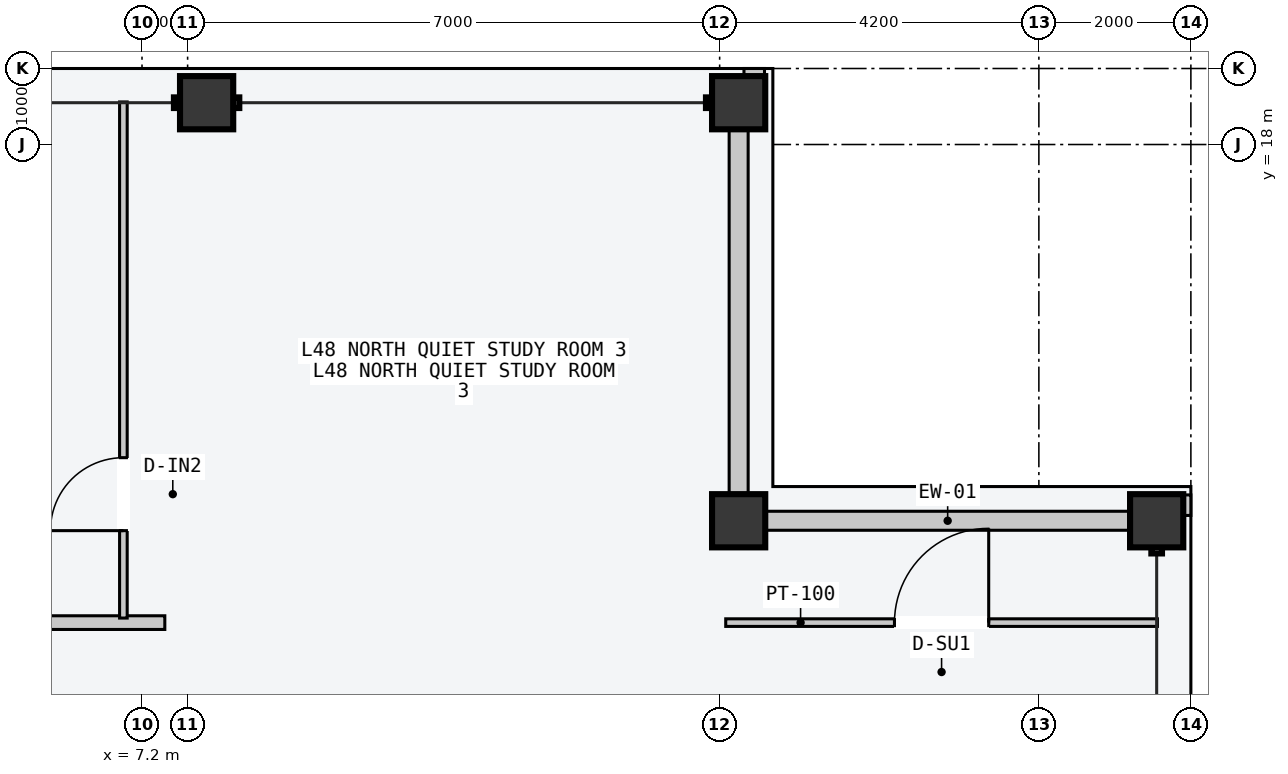
"""IFC4 building model, lengths in metres.
Left out: names, types, materials, properties, quantities, classifications, styles, units other than length and angle.
Written with IfcOpenShell. Run it as: python <this file> out.ifc"""

import sys

from ifc_helpers import new_model, si_unit, direction, frame, frame_2d, origin, origin_2d, place, context, subcontext, project, spatial, rectangle, hollow_rectangle, extrude, element, fill, save


model = new_model("IFC4")
c1 = context("Model", 3, precision=1e-05, world=origin(), true_north=direction((0.0, 1.0)))
c2 = subcontext(c1, "Body", "Model", "MODEL_VIEW")
j1 = project(units=[si_unit("LENGTHUNIT", "METRE"), si_unit("PLANEANGLEUNIT", "RADIAN")], contexts=[c1])
p1 = place(None, origin())
s1 = spatial("IfcSite", under=j1, at=p1, CompositionType="ELEMENT")
p2 = place(p1, origin())
s2 = spatial("IfcBuilding", under=s1, at=p2, CompositionType="ELEMENT")
p3 = place(p2, frame((0.0, 0.0, 183.9)))
s3 = spatial("IfcBuildingStorey", under=s2, at=p3, CompositionType="ELEMENT", Elevation=183.9)
for number, where, z_axis, x_axis in (
    (1, (8.05, 18.55, 0.0), (0.0, 0.0, 1.0), (1.0, 0.0, 0.0)),
    (2, (15.05, 18.55, 0.0), (0.0, 0.0, 1.0), (1.0, 0.0, 0.0)),
    (3, (20.55, 13.05, 0.0), (0.0, 0.0, 1.0), (0.0, 1.0, 0.0)),
    (4, (15.05, 13.05, 0.0), (0.0, 0.0, 1.0), (1.0, 0.0, 0.0)),
):
    element("IfcColumn", number, at=place(p3, frame(where, z_axis=z_axis, x_axis=x_axis)), inside=s3, PredefinedType="COLUMN", context=c2, shape_type="SweptSolid", body=[
        extrude(hollow_rectangle(XDim=0.7, YDim=0.7, WallThickness=0.03, at=origin_2d()), origin(), (0.0, 0.0, 1.0), 3.6),
    ])
for number, where, z_axis, x_axis in (
    (5, (15.41, 13.05, 0.0), (0.0, 0.0, 1.0), (1.0, 0.0, 0.0)),
    (6, (15.05, 13.41, 0.0), (0.0, 0.0, 1.0), (0.0, 1.0, 0.0)),
):
    element("IfcWall", number, at=place(p3, frame(where, z_axis=z_axis, x_axis=x_axis)), inside=s3, PredefinedType="STANDARD", context=c2, shape_type="SweptSolid", body=[
        extrude(rectangle(XDim=4.78, YDim=0.25, at=frame_2d((2.39, 0.0))), origin(), (0.0, 0.0, 1.0), 2.75),
    ])
for number, where, z_axis, x_axis in (
    (7, (15.12, 18.89, 0.0), (0.0, 0.0, 1.0), (1.0, 0.0, 0.0)),
    (8, (20.89, 13.12, 0.0), (0.0, 0.0, 1.0), (0.0, 1.0, 0.0)),
):
    element("IfcWall", number, at=place(p3, frame(where, z_axis=z_axis, x_axis=x_axis)), inside=s3, PredefinedType="PARAPET", context=c2, shape_type="SweptSolid", body=[
        extrude(rectangle(XDim=0.27, YDim=0.22, at=frame_2d((0.135, 0.0))), origin(), (0.0, 0.0, 1.0), 1.2),
    ])
p4 = place(p3, frame((1.26, 11.71, 0.0), z_axis=(0.0, 0.0, 1.0), x_axis=(1.0, 0.0, 0.0)))
e9 = element("IfcWall", 9, at=p4, inside=s3, PredefinedType="PARTITIONING", context=c2, shape_type="SweptSolid", body=[
    extrude(rectangle(XDim=6.24, YDim=0.18, at=frame_2d((3.12, 0.0))), origin(), (0.0, 0.0, 1.0), 3.4),
])
p5 = place(p3, frame((6.955, 11.77, 0.0), z_axis=(0.0, 0.0, 1.0), x_axis=(0.0, 1.0, 0.0)))
e10 = element("IfcWall", 10, at=p5, inside=s3, PredefinedType="PARTITIONING", context=c2, shape_type="SweptSolid", body=[
    extrude(rectangle(XDim=6.79, YDim=0.1, at=frame_2d((3.395, 0.0))), origin(), (0.0, 0.0, 1.0), 3.4),
])
p6 = place(p5, frame((1.15, 0.0, 0.0)))
e11 = element("IfcOpeningElement", 11, at=p6, cuts=e10, PredefinedType="OPENING", context=c2, shape_type="SweptSolid", body=[
    extrude(rectangle(XDim=0.96, YDim=2.18, at=frame_2d((0.48, 1.09))), frame((0.0, 0.06, 0.0), z_axis=(0.0, -1.0, 0.0), x_axis=(1.0, 0.0, 0.0)), (0.0, 0.0, 1.0), 0.12),
])
p7 = place(p3, frame((14.88, 11.71, 0.0), z_axis=(0.0, 0.0, 1.0), x_axis=(1.0, 0.0, 0.0)))
e12 = element("IfcWall", 12, at=p7, inside=s3, PredefinedType="PARTITIONING", context=c2, shape_type="SweptSolid", body=[
    extrude(rectangle(XDim=5.68, YDim=0.1, at=frame_2d((2.84, 0.0))), origin(), (0.0, 0.0, 1.0), 3.4),
])
p8 = place(p7, frame((2.22, 0.0, 0.0)))
e13 = element("IfcOpeningElement", 13, at=p8, cuts=e12, PredefinedType="OPENING", context=c2, shape_type="SweptSolid", body=[
    extrude(rectangle(XDim=1.24, YDim=2.24, at=frame_2d((0.62, 1.12))), frame((0.0, 0.06, 0.0), z_axis=(0.0, -1.0, 0.0), x_axis=(1.0, 0.0, 0.0)), (0.0, 0.0, 1.0), 0.12),
])
p9 = place(p6, origin())
e14 = element("IfcDoor", 14, at=p9, inside=s3, OperationType="SINGLE_SWING_LEFT", PredefinedType="DOOR", context=c2, shape_type="SweptSolid", body=[
    extrude(rectangle(XDim=0.96, YDim=2.18, at=frame_2d((0.48, 1.09))), frame((0.0, 0.025, 0.0), z_axis=(0.0, -1.0, 0.0), x_axis=(1.0, 0.0, 0.0)), (0.0, 0.0, 1.0), 0.05),
])
fill(e11, e14)
p10 = place(p8, origin())
e15 = element("IfcDoor", 15, at=p10, inside=s3, OperationType="SINGLE_SWING_RIGHT", PredefinedType="DOOR", context=c2, shape_type="SweptSolid", body=[
    extrude(rectangle(XDim=1.24, YDim=2.24, at=frame_2d((0.62, 1.12))), frame((0.0, 0.025, 0.0), z_axis=(0.0, -1.0, 0.0), x_axis=(1.0, 0.0, 0.0)), (0.0, 0.0, 1.0), 0.05),
])
fill(e13, e15)
save(model, sys.argv[1])
